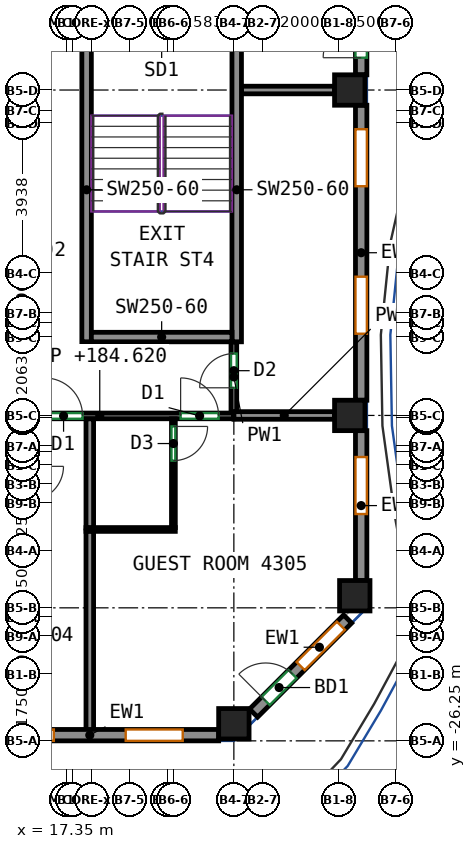
"""IFC4 building model, lengths in metres.
Left out: names, types, materials, properties, quantities, classifications, styles, units other than length and angle.
Written with IfcOpenShell. Run it as: python <this file> out.ifc"""

import sys

from ifc_helpers import new_model, si_unit, direction, frame, frame_2d, origin, origin_2d, place, context, subcontext, project, spatial, rectangle, extrude, source, transform, mapped, element, fill, save


model = new_model("IFC4")
c1 = context("Model", 3, precision=1e-05, world=origin(), true_north=direction((0.0, 1.0)))
c2 = subcontext(c1, "Body", "Model", "MODEL_VIEW")
j1 = project(units=[si_unit("LENGTHUNIT", "METRE"), si_unit("PLANEANGLEUNIT", "RADIAN")], contexts=[c1])
p1 = place(None, origin())
s1 = spatial("IfcSite", under=j1, at=p1, CompositionType="ELEMENT")
p2 = place(p1, origin())
s2 = spatial("IfcBuilding", under=s1, at=p2, CompositionType="ELEMENT")
p3 = place(p2, frame((0.0, 0.0, 182.1)))
s3 = spatial("IfcBuildingStorey", under=s2, at=p3, CompositionType="ELEMENT", Elevation=182.1)
m1 = source(origin(), c2, "Body", "SweptSolid", [
    extrude(rectangle(XDim=0.8, YDim=0.8, at=origin_2d()), origin(), (0.0, 0.0, 1.0), 3.12),
])
for number, where, z_axis, x_axis in (
    (1, (21.75, -25.8, 0.0), (0.0, 0.0, 1.0), (1.0, 0.0, 0.0)),
    (2, (24.8, -17.688, 0.0), (0.0, 0.0, 1.0), (1.0, 0.0, 0.0)),
    (3, (24.8, -9.125, 0.0), (0.0, 0.0, 1.0), (1.0, 0.0, 0.0)),
    (4, (24.932, -22.432, 0.0), (0.0, 0.0, 1.0), (1.0, 0.0, 0.0)),
):
    element("IfcColumn", number, at=place(p3, frame(where, z_axis=z_axis, x_axis=x_axis)), inside=s3, PredefinedType="COLUMN", context=c2, shape_type="MappedRepresentation", body=[
        mapped(m1, transform((0.0, 0.0, 0.0))),
    ])
m2 = source(origin(), c2, "Body", "SweptSolid", [
    extrude(rectangle(XDim=8.0, YDim=0.25, at=frame_2d((4.0, 0.0))), origin(), (0.0, 0.0, 1.0), 3.12),
])
for number, where, z_axis, x_axis in (
    (5, (17.875, -15.75, 0.0), (0.0, 0.0, 1.0), (0.0, 1.0, 0.0)),
    (6, (21.825, -15.75, 0.0), (0.0, 0.0, 1.0), (0.0, 1.0, 0.0)),
):
    element("IfcWall", number, at=place(p3, frame(where, z_axis=z_axis, x_axis=x_axis)), inside=s3, PredefinedType="SHEAR", context=c2, shape_type="MappedRepresentation", body=[
        mapped(m2, transform((0.0, 0.0, 0.0))),
    ])
m3 = source(origin(), c2, "Body", "SweptSolid", [
    extrude(rectangle(XDim=3.7, YDim=0.25, at=frame_2d((1.85, 0.0))), origin(), (0.0, 0.0, 1.0), 3.12),
])
p4 = place(p3, frame((18.0, -15.625, 0.0), z_axis=(0.0, 0.0, 1.0), x_axis=(1.0, 0.0, 0.0)))
e7 = element("IfcWall", 7, at=p4, inside=s3, PredefinedType="SHEAR", context=c2, shape_type="MappedRepresentation", body=[
    mapped(m3, transform((0.0, 0.0, 0.0))),
])
m4 = source(origin(), c2, "Body", "SweptSolid", [
    extrude(rectangle(XDim=6.783, YDim=0.3, at=frame_2d((3.392, 0.0))), origin(), (0.0, 0.0, 1.0), 3.12),
])
p5 = place(p3, frame((14.567, -26.1, 0.0), z_axis=(0.0, 0.0, 1.0), x_axis=(1.0, 0.0, 0.0)))
e8 = element("IfcWall", 8, at=p5, inside=s3, PredefinedType="SOLIDWALL", context=c2, shape_type="MappedRepresentation", body=[
    mapped(m4, transform((0.0, 0.0, 0.0))),
])
p6 = place(p5, frame((0.946, 0.0, 0.85)))
e9 = element("IfcOpeningElement", 9, at=p6, cuts=e8, PredefinedType="OPENING", context=c2, shape_type="SweptSolid", body=[
    extrude(rectangle(XDim=1.5, YDim=1.95, at=frame_2d((0.75, 0.975))), frame((0.0, 0.16, 0.0), z_axis=(0.0, -1.0, 0.0), x_axis=(1.0, 0.0, 0.0)), (0.0, 0.0, 1.0), 0.32),
])
p7 = place(p5, frame((4.337, 0.0, 0.85)))
e10 = element("IfcOpeningElement", 10, at=p7, cuts=e8, PredefinedType="OPENING", context=c2, shape_type="SweptSolid", body=[
    extrude(rectangle(XDim=1.5, YDim=1.95, at=frame_2d((0.75, 0.975))), frame((0.0, 0.16, 0.0), z_axis=(0.0, -1.0, 0.0), x_axis=(1.0, 0.0, 0.0)), (0.0, 0.0, 1.0), 0.32),
])
m5 = source(origin(), c2, "Body", "SweptSolid", [
    extrude(rectangle(XDim=3.5, YDim=0.3, at=frame_2d((1.75, 0.0))), origin(), (0.0, 0.0, 1.0), 3.12),
])
p8 = place(p3, frame((22.269, -25.519, 0.0), z_axis=(0.0, 0.0, 1.0), x_axis=(0.707141656123, 0.70707190453, 0.0)))
e11 = element("IfcWall", 11, at=p8, inside=s3, PredefinedType="SOLIDWALL", context=c2, shape_type="MappedRepresentation", body=[
    mapped(m5, transform((0.0, 0.0, 0.0))),
])
p9 = place(p8, frame((1.75, 0.0, 0.85)))
e12 = element("IfcOpeningElement", 12, at=p9, cuts=e11, PredefinedType="OPENING", context=c2, shape_type="SweptSolid", body=[
    extrude(rectangle(XDim=1.5, YDim=1.95, at=frame_2d((0.75, 0.975))), frame((0.0, 0.16, 0.0), z_axis=(0.0, -1.0, 0.0), x_axis=(1.0, 0.0, 0.0)), (0.0, 0.0, 1.0), 0.32),
])
p10 = place(p8, frame((0.45, 0.0, 0.0)))
e13 = element("IfcOpeningElement", 13, at=p10, cuts=e11, PredefinedType="OPENING", context=c2, shape_type="SweptSolid", body=[
    extrude(rectangle(XDim=1.0, YDim=2.1, at=frame_2d((0.5, 1.05))), frame((0.0, 0.16, 0.0), z_axis=(0.0, -1.0, 0.0), x_axis=(1.0, 0.0, 0.0)), (0.0, 0.0, 1.0), 0.32),
])
m6 = source(origin(), c2, "Body", "SweptSolid", [
    extrude(rectangle(XDim=3.944, YDim=0.3, at=frame_2d((1.972, 0.0))), origin(), (0.0, 0.0, 1.0), 3.12),
])
p11 = place(p3, frame((25.1, -22.032, 0.0), z_axis=(0.0, 0.0, 1.0), x_axis=(0.0, 1.0, 0.0)))
e14 = element("IfcWall", 14, at=p11, inside=s3, PredefinedType="SOLIDWALL", context=c2, shape_type="MappedRepresentation", body=[
    mapped(m6, transform((0.0, 0.0, 0.0))),
])
p12 = place(p11, frame((1.75, 0.0, 0.85)))
e15 = element("IfcOpeningElement", 15, at=p12, cuts=e14, PredefinedType="OPENING", context=c2, shape_type="SweptSolid", body=[
    extrude(rectangle(XDim=1.5, YDim=1.95, at=frame_2d((0.75, 0.975))), frame((0.0, 0.16, 0.0), z_axis=(0.0, -1.0, 0.0), x_axis=(1.0, 0.0, 0.0)), (0.0, 0.0, 1.0), 0.32),
])
m7 = source(origin(), c2, "Body", "SweptSolid", [
    extrude(rectangle(XDim=7.763, YDim=0.3, at=frame_2d((3.881, 0.0))), origin(), (0.0, 0.0, 1.0), 3.12),
])
p13 = place(p3, frame((25.1, -17.288, 0.0), z_axis=(0.0, 0.0, 1.0), x_axis=(0.0, 1.0, 0.0)))
e16 = element("IfcWall", 16, at=p13, inside=s3, PredefinedType="SOLIDWALL", context=c2, shape_type="MappedRepresentation", body=[
    mapped(m7, transform((0.0, 0.0, 0.0))),
])
p14 = place(p13, frame((1.75, 0.0, 0.85)))
e17 = element("IfcOpeningElement", 17, at=p14, cuts=e16, PredefinedType="OPENING", context=c2, shape_type="SweptSolid", body=[
    extrude(rectangle(XDim=1.5, YDim=1.95, at=frame_2d((0.75, 0.975))), frame((0.0, 0.16, 0.0), z_axis=(0.0, -1.0, 0.0), x_axis=(1.0, 0.0, 0.0)), (0.0, 0.0, 1.0), 0.32),
])
p15 = place(p13, frame((5.631, 0.0, 0.85)))
e18 = element("IfcOpeningElement", 18, at=p15, cuts=e16, PredefinedType="OPENING", context=c2, shape_type="SweptSolid", body=[
    extrude(rectangle(XDim=1.5, YDim=1.95, at=frame_2d((0.75, 0.975))), frame((0.0, 0.16, 0.0), z_axis=(0.0, -1.0, 0.0), x_axis=(1.0, 0.0, 0.0)), (0.0, 0.0, 1.0), 0.32),
])
p16 = place(p3, frame((25.1, -8.725, 0.0), z_axis=(0.0, 0.0, 1.0), x_axis=(0.0, 1.0, 0.0)))
e19 = element("IfcWall", 19, at=p16, inside=s3, PredefinedType="SOLIDWALL", context=c2, shape_type="MappedRepresentation", body=[
    mapped(m7, transform((0.0, 0.0, 0.0))),
])
p17 = place(p16, frame((1.75, 0.0, 0.85)))
e20 = element("IfcOpeningElement", 20, at=p17, cuts=e19, PredefinedType="OPENING", context=c2, shape_type="SweptSolid", body=[
    extrude(rectangle(XDim=1.5, YDim=1.95, at=frame_2d((0.75, 0.975))), frame((0.0, 0.16, 0.0), z_axis=(0.0, -1.0, 0.0), x_axis=(1.0, 0.0, 0.0)), (0.0, 0.0, 1.0), 0.32),
])
p18 = place(p16, frame((0.45, 0.0, 0.0)))
e21 = element("IfcOpeningElement", 21, at=p18, cuts=e19, PredefinedType="OPENING", context=c2, shape_type="SweptSolid", body=[
    extrude(rectangle(XDim=1.0, YDim=2.1, at=frame_2d((0.5, 1.05))), frame((0.0, 0.16, 0.0), z_axis=(0.0, -1.0, 0.0), x_axis=(1.0, 0.0, 0.0)), (0.0, 0.0, 1.0), 0.32),
])
p19 = place(p16, frame((5.631, 0.0, 0.85)))
e22 = element("IfcOpeningElement", 22, at=p19, cuts=e19, PredefinedType="OPENING", context=c2, shape_type="SweptSolid", body=[
    extrude(rectangle(XDim=1.5, YDim=1.95, at=frame_2d((0.75, 0.975))), frame((0.0, 0.16, 0.0), z_axis=(0.0, -1.0, 0.0), x_axis=(1.0, 0.0, 0.0)), (0.0, 0.0, 1.0), 0.32),
])
p20 = place(p16, frame((4.331, 0.0, 0.0)))
e23 = element("IfcOpeningElement", 23, at=p20, cuts=e19, PredefinedType="OPENING", context=c2, shape_type="SweptSolid", body=[
    extrude(rectangle(XDim=1.0, YDim=2.1, at=frame_2d((0.5, 1.05))), frame((0.0, 0.16, 0.0), z_axis=(0.0, -1.0, 0.0), x_axis=(1.0, 0.0, 0.0)), (0.0, 0.0, 1.0), 0.32),
])
p21 = place(p3, frame((14.692, -17.7, 0.0), z_axis=(0.0, 0.0, 1.0), x_axis=(1.0, 0.0, 0.0)))
e24 = element("IfcWall", 24, at=p21, inside=s3, PredefinedType="PARTITIONING", context=c2, shape_type="SweptSolid", body=[
    extrude(rectangle(XDim=7.058, YDim=0.15, at=frame_2d((3.529, 0.0))), origin(), (0.0, 0.0, 1.0), 2.52),
])
p22 = place(p21, frame((2.077, 0.0, 0.0)))
e25 = element("IfcOpeningElement", 25, at=p22, cuts=e24, PredefinedType="OPENING", context=c2, shape_type="SweptSolid", body=[
    extrude(rectangle(XDim=1.0, YDim=2.1, at=frame_2d((0.5, 1.05))), frame((0.0, 0.085, 0.0), z_axis=(0.0, -1.0, 0.0), x_axis=(1.0, 0.0, 0.0)), (0.0, 0.0, 1.0), 0.17),
])
p23 = place(p21, frame((5.657, 0.0, 0.0)))
e26 = element("IfcOpeningElement", 26, at=p23, cuts=e24, PredefinedType="OPENING", context=c2, shape_type="SweptSolid", body=[
    extrude(rectangle(XDim=1.0, YDim=2.1, at=frame_2d((0.5, 1.05))), frame((0.0, 0.085, 0.0), z_axis=(0.0, -1.0, 0.0), x_axis=(1.0, 0.0, 0.0)), (0.0, 0.0, 1.0), 0.17),
])
p24 = place(p3, frame((21.75, -17.598, 0.0), z_axis=(0.0, 0.0, 1.0), x_axis=(0.0, 1.0, 0.0)))
e27 = element("IfcWall", 27, at=p24, inside=s3, PredefinedType="PARTITIONING", context=c2, shape_type="SweptSolid", body=[
    extrude(rectangle(XDim=1.848, YDim=0.15, at=frame_2d((0.924, 0.0))), origin(), (0.0, 0.0, 1.0), 3.12),
])
p25 = place(p24, frame((0.638, 0.0, 0.0)))
e28 = element("IfcOpeningElement", 28, at=p25, cuts=e27, PredefinedType="OPENING", context=c2, shape_type="SweptSolid", body=[
    extrude(rectangle(XDim=0.9, YDim=2.1, at=frame_2d((0.45, 1.05))), frame((0.0, 0.085, 0.0), z_axis=(0.0, -1.0, 0.0), x_axis=(1.0, 0.0, 0.0)), (0.0, 0.0, 1.0), 0.17),
])
p26 = place(p3, frame((17.959, -26.0, 0.0), z_axis=(0.0, 0.0, 1.0), x_axis=(0.0, 1.0, 0.0)))
e29 = element("IfcWall", 29, at=p26, inside=s3, PredefinedType="PARTITIONING", context=c2, shape_type="SweptSolid", body=[
    extrude(rectangle(XDim=5.272, YDim=0.2, at=frame_2d((2.636, 0.0))), origin(), (0.0, 0.0, 1.0), 3.12),
])
p27 = place(p3, frame((17.959, -20.648, 0.0), z_axis=(0.0, 0.0, 1.0), x_axis=(0.0, 1.0, 0.0)))
e30 = element("IfcWall", 30, at=p27, inside=s3, PredefinedType="PARTITIONING", context=c2, shape_type="SweptSolid", body=[
    extrude(rectangle(XDim=2.871, YDim=0.2, at=frame_2d((1.436, 0.0))), origin(), (0.0, 0.0, 1.0), 3.12),
])
p28 = place(p3, frame((17.859, -20.688, 0.0), z_axis=(0.0, 0.0, 1.0), x_axis=(1.0, 0.0, 0.0)))
e31 = element("IfcWall", 31, at=p28, inside=s3, PredefinedType="PARTITIONING", context=c2, shape_type="SweptSolid", body=[
    extrude(rectangle(XDim=2.35, YDim=0.1, at=frame_2d((1.175, 0.0))), origin(), (0.0, 0.0, 1.0), 3.12),
])
p29 = place(p3, frame((20.159, -17.777, 0.0), z_axis=(0.0, 0.0, 1.0), x_axis=(0.0, -1.0, 0.0)))
e32 = element("IfcWall", 32, at=p29, inside=s3, PredefinedType="PARTITIONING", context=c2, shape_type="SweptSolid", body=[
    extrude(rectangle(XDim=2.861, YDim=0.1, at=frame_2d((1.43, 0.0))), origin(), (0.0, 0.0, 1.0), 3.12),
])
p30 = place(p29, frame((0.2, 0.0, 0.0)))
e33 = element("IfcOpeningElement", 33, at=p30, cuts=e32, PredefinedType="OPENING", context=c2, shape_type="SweptSolid", body=[
    extrude(rectangle(XDim=0.9, YDim=2.1, at=frame_2d((0.45, 1.05))), frame((0.0, 0.06, 0.0), z_axis=(0.0, -1.0, 0.0), x_axis=(1.0, 0.0, 0.0)), (0.0, 0.0, 1.0), 0.12),
])
p31 = place(p3, frame((21.752, -17.688, 0.0), z_axis=(0.0, 0.0, 1.0), x_axis=(1.0, 0.0, 0.0)))
e34 = element("IfcWall", 34, at=p31, inside=s3, PredefinedType="PARTITIONING", context=c2, shape_type="SweptSolid", body=[
    extrude(rectangle(XDim=2.648, YDim=0.2, at=frame_2d((1.324, 0.0))), origin(), (0.0, 0.0, 1.0), 2.52),
])
p32 = place(p3, frame((21.95, -9.125, 0.0), z_axis=(0.0, 0.0, 1.0), x_axis=(1.0, 0.0, 0.0)))
e35 = element("IfcWall", 35, at=p32, inside=s3, PredefinedType="PARTITIONING", context=c2, shape_type="SweptSolid", body=[
    extrude(rectangle(XDim=2.45, YDim=0.2, at=frame_2d((1.225, 0.0))), origin(), (0.0, 0.0, 1.0), 3.12),
])
p33 = place(p6, origin())
e36 = element("IfcWindow", 36, at=p33, inside=s3, PartitioningType="SINGLE_PANEL", PredefinedType="WINDOW", context=c2, shape_type="SweptSolid", body=[
    extrude(rectangle(XDim=1.5, YDim=1.95, at=frame_2d((0.75, 0.975))), frame((0.0, 0.03, 0.0), z_axis=(0.0, -1.0, 0.0), x_axis=(1.0, 0.0, 0.0)), (0.0, 0.0, 1.0), 0.06),
])
fill(e9, e36)
p34 = place(p7, origin())
e37 = element("IfcWindow", 37, at=p34, inside=s3, PartitioningType="SINGLE_PANEL", PredefinedType="WINDOW", context=c2, shape_type="SweptSolid", body=[
    extrude(rectangle(XDim=1.5, YDim=1.95, at=frame_2d((0.75, 0.975))), frame((0.0, 0.03, 0.0), z_axis=(0.0, -1.0, 0.0), x_axis=(1.0, 0.0, 0.0)), (0.0, 0.0, 1.0), 0.06),
])
fill(e10, e37)
p35 = place(p9, origin())
e38 = element("IfcWindow", 38, at=p35, inside=s3, PartitioningType="SINGLE_PANEL", PredefinedType="WINDOW", context=c2, shape_type="SweptSolid", body=[
    extrude(rectangle(XDim=1.5, YDim=1.95, at=frame_2d((0.75, 0.975))), frame((0.0, 0.03, 0.0), z_axis=(0.0, -1.0, 0.0), x_axis=(1.0, 0.0, 0.0)), (0.0, 0.0, 1.0), 0.06),
])
fill(e12, e38)
p36 = place(p10, origin())
e39 = element("IfcDoor", 39, at=p36, inside=s3, OperationType="SINGLE_SWING_LEFT", PredefinedType="DOOR", context=c2, shape_type="SweptSolid", body=[
    extrude(rectangle(XDim=1.0, YDim=2.1, at=frame_2d((0.5, 1.05))), frame((0.0, 0.025, 0.0), z_axis=(0.0, -1.0, 0.0), x_axis=(1.0, 0.0, 0.0)), (0.0, 0.0, 1.0), 0.05),
])
fill(e13, e39)
p37 = place(p12, origin())
e40 = element("IfcWindow", 40, at=p37, inside=s3, PartitioningType="SINGLE_PANEL", PredefinedType="WINDOW", context=c2, shape_type="SweptSolid", body=[
    extrude(rectangle(XDim=1.5, YDim=1.95, at=frame_2d((0.75, 0.975))), frame((0.0, 0.03, 0.0), z_axis=(0.0, -1.0, 0.0), x_axis=(1.0, 0.0, 0.0)), (0.0, 0.0, 1.0), 0.06),
])
fill(e15, e40)
p38 = place(p14, origin())
e41 = element("IfcWindow", 41, at=p38, inside=s3, PartitioningType="SINGLE_PANEL", PredefinedType="WINDOW", context=c2, shape_type="SweptSolid", body=[
    extrude(rectangle(XDim=1.5, YDim=1.95, at=frame_2d((0.75, 0.975))), frame((0.0, 0.03, 0.0), z_axis=(0.0, -1.0, 0.0), x_axis=(1.0, 0.0, 0.0)), (0.0, 0.0, 1.0), 0.06),
])
fill(e17, e41)
p39 = place(p15, origin())
e42 = element("IfcWindow", 42, at=p39, inside=s3, PartitioningType="SINGLE_PANEL", PredefinedType="WINDOW", context=c2, shape_type="SweptSolid", body=[
    extrude(rectangle(XDim=1.5, YDim=1.95, at=frame_2d((0.75, 0.975))), frame((0.0, 0.03, 0.0), z_axis=(0.0, -1.0, 0.0), x_axis=(1.0, 0.0, 0.0)), (0.0, 0.0, 1.0), 0.06),
])
fill(e18, e42)
p40 = place(p18, origin())
e43 = element("IfcDoor", 43, at=p40, inside=s3, OperationType="SINGLE_SWING_LEFT", PredefinedType="DOOR", context=c2, shape_type="SweptSolid", body=[
    extrude(rectangle(XDim=1.0, YDim=2.1, at=frame_2d((0.5, 1.05))), frame((0.0, 0.025, 0.0), z_axis=(0.0, -1.0, 0.0), x_axis=(1.0, 0.0, 0.0)), (0.0, 0.0, 1.0), 0.05),
])
fill(e21, e43)
p41 = place(p30, origin())
e44 = element("IfcDoor", 44, at=p41, inside=s3, OperationType="SINGLE_SWING_LEFT", PredefinedType="DOOR", context=c2, shape_type="SweptSolid", body=[
    extrude(rectangle(XDim=0.9, YDim=2.1, at=frame_2d((0.45, 1.05))), frame((0.0, 0.025, 0.0), z_axis=(0.0, -1.0, 0.0), x_axis=(1.0, 0.0, 0.0)), (0.0, 0.0, 1.0), 0.05),
])
fill(e33, e44)
p42 = place(p22, origin())
e45 = element("IfcDoor", 45, at=p42, inside=s3, OperationType="SINGLE_SWING_LEFT", PredefinedType="DOOR", context=c2, shape_type="SweptSolid", body=[
    extrude(rectangle(XDim=1.0, YDim=2.1, at=frame_2d((0.5, 1.05))), frame((0.0, 0.025, 0.0), z_axis=(0.0, -1.0, 0.0), x_axis=(1.0, 0.0, 0.0)), (0.0, 0.0, 1.0), 0.05),
])
fill(e25, e45)
p43 = place(p23, origin())
e46 = element("IfcDoor", 46, at=p43, inside=s3, OperationType="SINGLE_SWING_LEFT", PredefinedType="DOOR", context=c2, shape_type="SweptSolid", body=[
    extrude(rectangle(XDim=1.0, YDim=2.1, at=frame_2d((0.5, 1.05))), frame((0.0, 0.025, 0.0), z_axis=(0.0, -1.0, 0.0), x_axis=(1.0, 0.0, 0.0)), (0.0, 0.0, 1.0), 0.05),
])
fill(e26, e46)
p44 = place(p25, origin())
e47 = element("IfcDoor", 47, at=p44, inside=s3, OperationType="SINGLE_SWING_LEFT", PredefinedType="DOOR", context=c2, shape_type="SweptSolid", body=[
    extrude(rectangle(XDim=0.9, YDim=2.1, at=frame_2d((0.45, 1.05))), frame((0.0, 0.025, 0.0), z_axis=(0.0, -1.0, 0.0), x_axis=(1.0, 0.0, 0.0)), (0.0, 0.0, 1.0), 0.05),
])
fill(e28, e47)
save(model, sys.argv[1])
